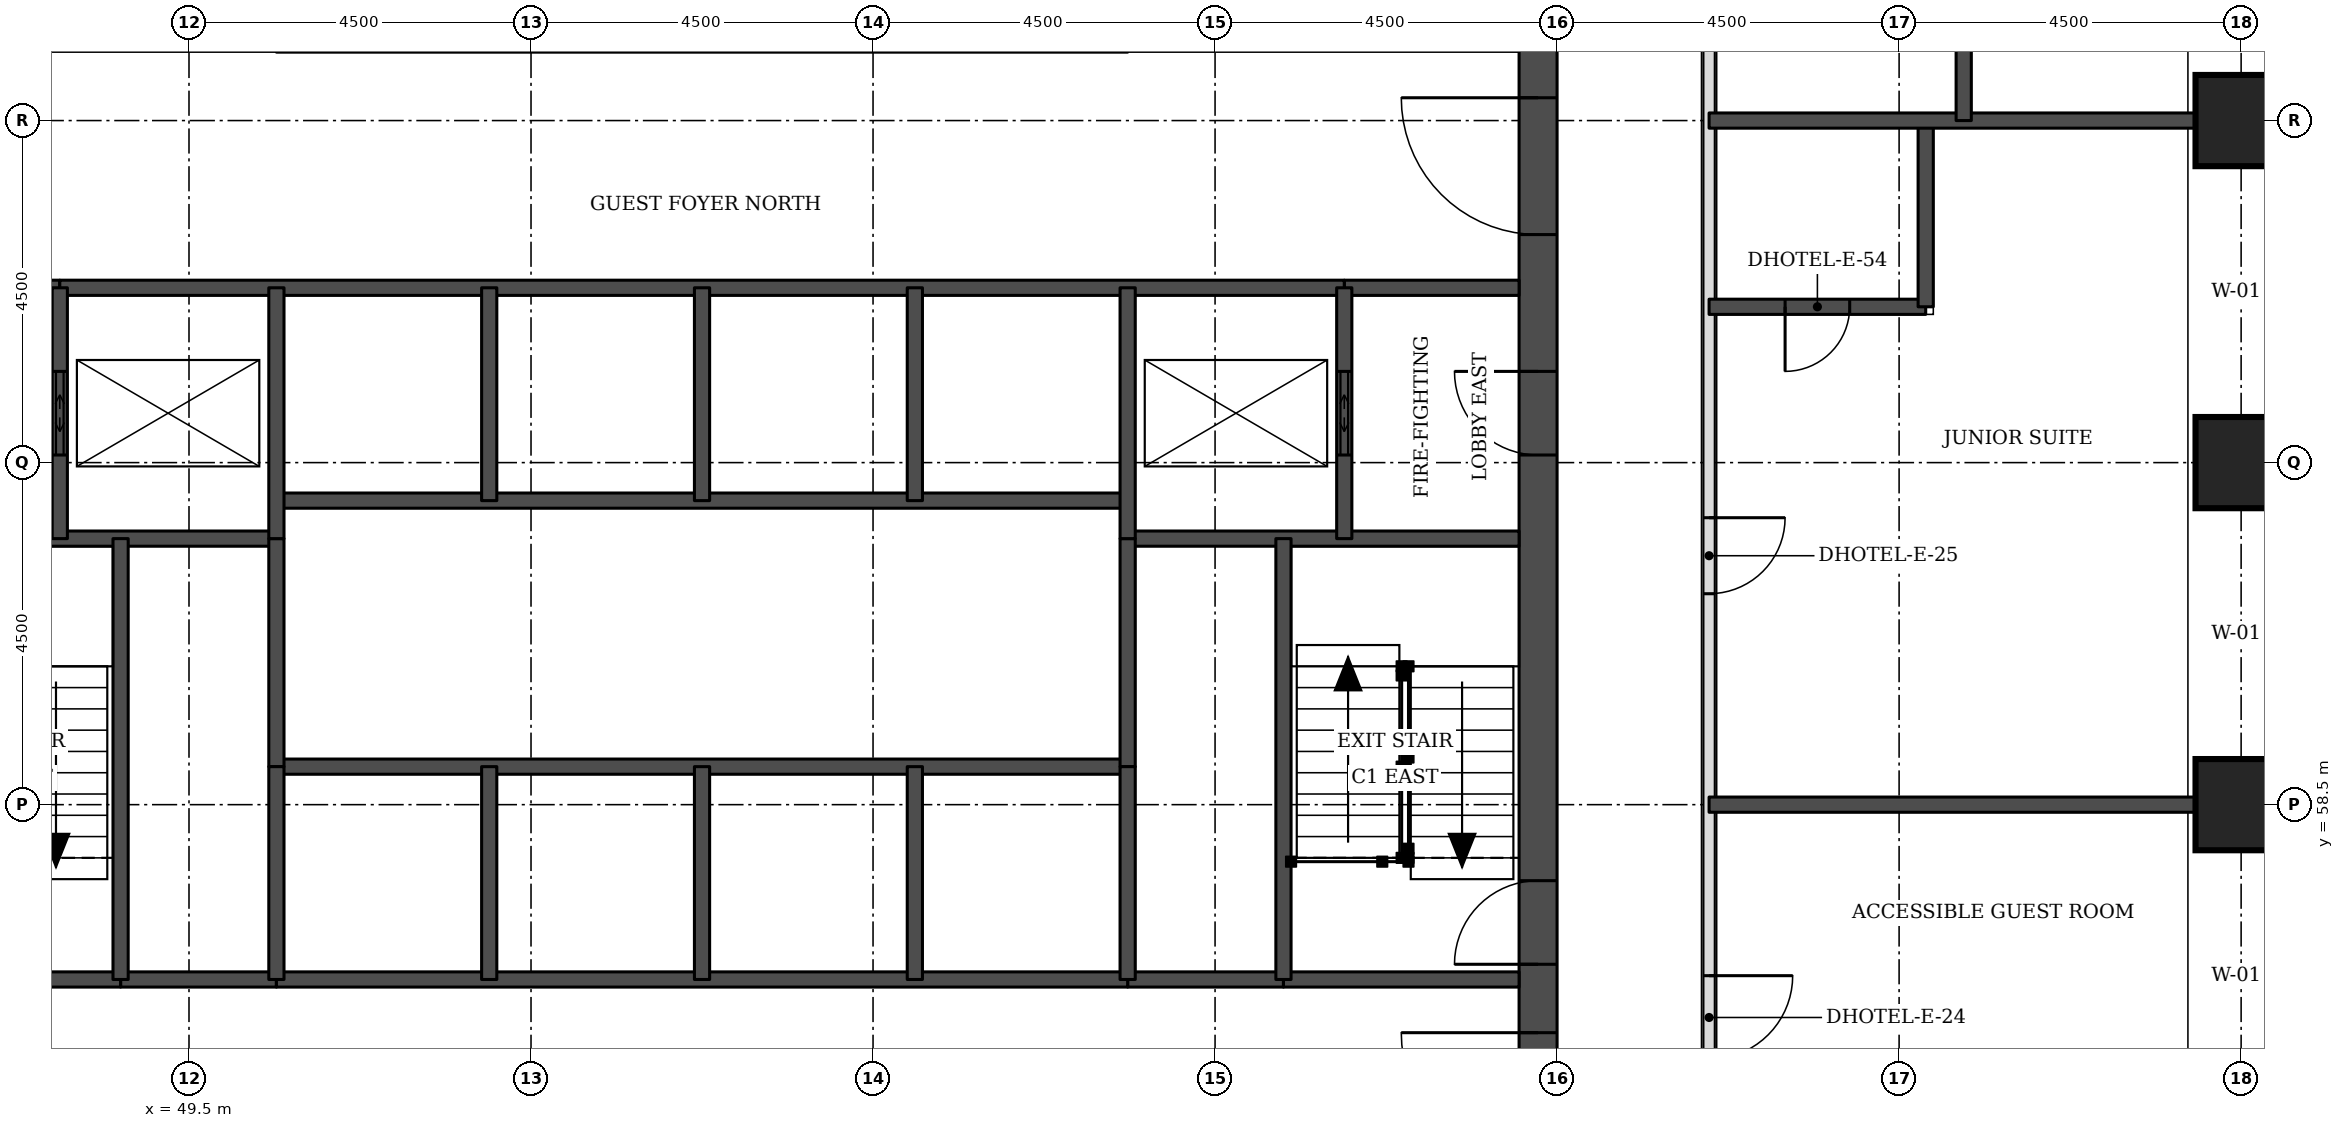
"""IFC4 building model, lengths in metres.
Left out: names, types, materials, properties, quantities, classifications, styles, units other than length and angle.
Written with IfcOpenShell. Run it as: python <this file> out.ifc"""

import sys

from ifc_helpers import new_model, si_unit, direction, frame, frame_2d, origin, origin_2d, place, context, subcontext, project, spatial, rectangle, extrude, element, fill, save


model = new_model("IFC4")
c1 = context("Model", 3, precision=1e-05, world=origin(), true_north=direction((0.0, 1.0)))
c2 = subcontext(c1, "Body", "Model", "MODEL_VIEW")
j1 = project(units=[si_unit("LENGTHUNIT", "METRE"), si_unit("PLANEANGLEUNIT", "RADIAN")], contexts=[c1])
p1 = place(None, origin())
s1 = spatial("IfcSite", under=j1, at=p1, CompositionType="ELEMENT")
p2 = place(p1, origin())
s2 = spatial("IfcBuilding", under=s1, at=p2, CompositionType="ELEMENT")
p3 = place(p2, frame((0.0, 0.0, 62.7)))
s3 = spatial("IfcBuildingStorey", under=s2, at=p3, CompositionType="ELEMENT", Elevation=62.7)
for number, where, z_axis, x_axis in (
    (1, (76.5, 58.5, 0.0), (0.0, 0.0, 1.0), (1.0, 0.0, 0.0)),
    (2, (76.5, 63.0, 0.0), (0.0, 0.0, 1.0), (1.0, 0.0, 0.0)),
    (3, (76.5, 67.5, 0.0), (0.0, 0.0, 1.0), (1.0, 0.0, 0.0)),
):
    element("IfcColumn", number, at=place(p3, frame(where, z_axis=z_axis, x_axis=x_axis)), inside=s3, PredefinedType="COLUMN", context=c2, shape_type="SweptSolid", body=[
        extrude(rectangle(XDim=1.2, YDim=1.2, at=origin_2d()), origin(), (0.0, 0.0, 1.0), 3.3),
    ])
p4 = place(p3, frame((67.25, 49.5, 0.0), z_axis=(0.0, 0.0, 1.0), x_axis=(0.0, 1.0, 0.0)))
e4 = element("IfcWall", 4, at=p4, inside=s3, PredefinedType="SHEAR", context=c2, shape_type="SweptSolid", body=[
    extrude(rectangle(XDim=22.5, YDim=0.5, at=frame_2d((11.25, 0.0))), origin(), (0.0, 0.0, 1.0), 3.3),
])
p5 = place(p4, frame((4.2, 0.0, 0.0)))
e5 = element("IfcOpeningElement", 5, at=p5, cuts=e4, PredefinedType="OPENING", context=c2, shape_type="SweptSolid", body=[
    extrude(rectangle(XDim=1.8, YDim=2.1, at=frame_2d((0.9, 1.05))), frame((0.0, 0.26, 0.0), z_axis=(0.0, -1.0, 0.0), x_axis=(1.0, 0.0, 0.0)), (0.0, 0.0, 1.0), 0.52),
])
p6 = place(p4, frame((6.9, 0.0, 0.0)))
e6 = element("IfcOpeningElement", 6, at=p6, cuts=e4, PredefinedType="OPENING", context=c2, shape_type="SweptSolid", body=[
    extrude(rectangle(XDim=1.1, YDim=2.1, at=frame_2d((0.55, 1.05))), frame((0.0, 0.26, 0.0), z_axis=(0.0, -1.0, 0.0), x_axis=(1.0, 0.0, 0.0)), (0.0, 0.0, 1.0), 0.52),
])
p7 = place(p4, frame((13.6, 0.0, 0.0)))
e7 = element("IfcOpeningElement", 7, at=p7, cuts=e4, PredefinedType="OPENING", context=c2, shape_type="SweptSolid", body=[
    extrude(rectangle(XDim=1.1, YDim=2.1, at=frame_2d((0.55, 1.05))), frame((0.0, 0.26, 0.0), z_axis=(0.0, -1.0, 0.0), x_axis=(1.0, 0.0, 0.0)), (0.0, 0.0, 1.0), 0.52),
])
p8 = place(p4, frame((16.5, 0.0, 0.0)))
e8 = element("IfcOpeningElement", 8, at=p8, cuts=e4, PredefinedType="OPENING", context=c2, shape_type="SweptSolid", body=[
    extrude(rectangle(XDim=1.8, YDim=2.1, at=frame_2d((0.9, 1.05))), frame((0.0, 0.26, 0.0), z_axis=(0.0, -1.0, 0.0), x_axis=(1.0, 0.0, 0.0)), (0.0, 0.0, 1.0), 0.52),
])
p9 = place(p3, frame((69.5, 47.5, 0.0), z_axis=(0.0, 0.0, 1.0), x_axis=(0.0, 1.0, 0.0)))
e9 = element("IfcWall", 9, at=p9, inside=s3, PredefinedType="PARTITIONING", context=c2, shape_type="SweptSolid", body=[
    extrude(rectangle(XDim=26.5, YDim=0.15, at=frame_2d((13.25, 0.0))), origin(), (0.0, 0.0, 1.0), 3.08),
])
p10 = place(p9, frame((25.053, 0.0, 0.0)))
e10 = element("IfcOpeningElement", 10, at=p10, cuts=e9, PredefinedType="OPENING", context=c2, shape_type="SweptSolid", body=[
    extrude(rectangle(XDim=1.0, YDim=2.1, at=frame_2d((0.5, 1.05))), frame((0.0, 0.085, 0.0), z_axis=(0.0, -1.0, 0.0), x_axis=(1.0, 0.0, 0.0)), (0.0, 0.0, 1.0), 0.17),
])
p11 = place(p9, frame((13.775, 0.0, 0.0)))
e11 = element("IfcOpeningElement", 11, at=p11, cuts=e9, PredefinedType="OPENING", context=c2, shape_type="SweptSolid", body=[
    extrude(rectangle(XDim=1.0, YDim=2.1, at=frame_2d((0.5, 1.05))), frame((0.0, 0.085, 0.0), z_axis=(0.0, -1.0, 0.0), x_axis=(1.0, 0.0, 0.0)), (0.0, 0.0, 1.0), 0.17),
])
p12 = place(p9, frame((7.65, 0.0, 0.0)))
e12 = element("IfcOpeningElement", 12, at=p12, cuts=e9, PredefinedType="OPENING", context=c2, shape_type="SweptSolid", body=[
    extrude(rectangle(XDim=1.1, YDim=2.1, at=frame_2d((0.55, 1.05))), frame((0.0, 0.085, 0.0), z_axis=(0.0, -1.0, 0.0), x_axis=(1.0, 0.0, 0.0)), (0.0, 0.0, 1.0), 0.17),
])
p13 = place(p9, frame((0.447, 0.0, 0.0)))
e13 = element("IfcOpeningElement", 13, at=p13, cuts=e9, PredefinedType="OPENING", context=c2, shape_type="SweptSolid", body=[
    extrude(rectangle(XDim=1.0, YDim=2.1, at=frame_2d((0.5, 1.05))), frame((0.0, 0.085, 0.0), z_axis=(0.0, -1.0, 0.0), x_axis=(1.0, 0.0, 0.0)), (0.0, 0.0, 1.0), 0.17),
])
p14 = place(p3, frame((69.5, 58.5, 0.0), z_axis=(0.0, 0.0, 1.0), x_axis=(1.0, 0.0, 0.0)))
e14 = element("IfcWall", 14, at=p14, inside=s3, PredefinedType="SOLIDWALL", context=c2, shape_type="SweptSolid", body=[
    extrude(rectangle(XDim=6.4, YDim=0.2, at=frame_2d((3.2, 0.0))), origin(), (0.0, 0.0, 1.0), 3.08),
])
p15 = place(p3, frame((69.5, 65.05, 0.0), z_axis=(0.0, 0.0, 1.0), x_axis=(1.0, 0.0, 0.0)))
e15 = element("IfcWall", 15, at=p15, inside=s3, PredefinedType="SOLIDWALL", context=c2, shape_type="SweptSolid", body=[
    extrude(rectangle(XDim=2.85, YDim=0.2, at=frame_2d((1.425, 0.0))), origin(), (0.0, 0.0, 1.0), 3.08),
])
p16 = place(p15, frame((1.0, 0.0, 0.0)))
e16 = element("IfcOpeningElement", 16, at=p16, cuts=e15, PredefinedType="OPENING", context=c2, shape_type="SweptSolid", body=[
    extrude(rectangle(XDim=0.85, YDim=2.1, at=frame_2d((0.425, 1.05))), frame((0.0, 0.11, 0.0), z_axis=(0.0, -1.0, 0.0), x_axis=(1.0, 0.0, 0.0)), (0.0, 0.0, 1.0), 0.22),
])
p17 = place(p3, frame((72.35, 65.05, 0.0), z_axis=(0.0, 0.0, 1.0), x_axis=(0.0, 1.0, 0.0)))
e17 = element("IfcWall", 17, at=p17, inside=s3, PredefinedType="SOLIDWALL", context=c2, shape_type="SweptSolid", body=[
    extrude(rectangle(XDim=2.45, YDim=0.2, at=frame_2d((1.225, 0.0))), origin(), (0.0, 0.0, 1.0), 3.08),
])
p18 = place(p3, frame((69.5, 67.5, 0.0), z_axis=(0.0, 0.0, 1.0), x_axis=(1.0, 0.0, 0.0)))
e18 = element("IfcWall", 18, at=p18, inside=s3, PredefinedType="SOLIDWALL", context=c2, shape_type="SweptSolid", body=[
    extrude(rectangle(XDim=6.4, YDim=0.2, at=frame_2d((3.2, 0.0))), origin(), (0.0, 0.0, 1.0), 3.08),
])
p19 = place(p3, frame((72.85, 67.5, 0.0), z_axis=(0.0, 0.0, 1.0), x_axis=(0.0, 1.0, 0.0)))
e19 = element("IfcWall", 19, at=p19, inside=s3, PredefinedType="SOLIDWALL", context=c2, shape_type="SweptSolid", body=[
    extrude(rectangle(XDim=2.95, YDim=0.2, at=frame_2d((1.475, 0.0))), origin(), (0.0, 0.0, 1.0), 3.08),
])
for number, where, z_axis, x_axis in (
    (20, (48.6, 56.2, 0.0), (0.0, 0.0, 1.0), (1.0, 0.0, 0.0)),
    (21, (61.85, 56.2, 0.0), (0.0, 0.0, 1.0), (1.0, 0.0, 0.0)),
):
    element("IfcWall", number, at=place(p3, frame(where, z_axis=z_axis, x_axis=x_axis)), inside=s3, PredefinedType="SOLIDWALL", context=c2, shape_type="SweptSolid", body=[
        extrude(rectangle(XDim=2.05, YDim=0.2, at=frame_2d((1.025, 0.0))), origin(), (0.0, 0.0, 1.0), 3.08),
    ])
p20 = place(p3, frame((45.5, 56.2, 0.0), z_axis=(0.0, 0.0, 1.0), x_axis=(1.0, 0.0, 0.0)))
e22 = element("IfcWall", 22, at=p20, inside=s3, PredefinedType="SOLIDWALL", context=c2, shape_type="SweptSolid", body=[
    extrude(rectangle(XDim=3.1, YDim=0.2, at=frame_2d((1.55, 0.0))), origin(), (0.0, 0.0, 1.0), 3.08),
])
p21 = place(p3, frame((50.65, 56.2, 0.0), z_axis=(0.0, 0.0, 1.0), x_axis=(1.0, 0.0, 0.0)))
e23 = element("IfcWall", 23, at=p21, inside=s3, PredefinedType="SOLIDWALL", context=c2, shape_type="SweptSolid", body=[
    extrude(rectangle(XDim=11.2, YDim=0.2, at=frame_2d((5.6, 0.0))), origin(), (0.0, 0.0, 1.0), 3.08),
])
p22 = place(p3, frame((63.9, 56.2, 0.0), z_axis=(0.0, 0.0, 1.0), x_axis=(1.0, 0.0, 0.0)))
e24 = element("IfcWall", 24, at=p22, inside=s3, PredefinedType="SOLIDWALL", context=c2, shape_type="SweptSolid", body=[
    extrude(rectangle(XDim=3.1, YDim=0.2, at=frame_2d((1.55, 0.0))), origin(), (0.0, 0.0, 1.0), 3.08),
])
p23 = place(p3, frame((50.65, 59.0, 0.0), z_axis=(0.0, 0.0, 1.0), x_axis=(1.0, 0.0, 0.0)))
e25 = element("IfcWall", 25, at=p23, inside=s3, PredefinedType="SOLIDWALL", context=c2, shape_type="SweptSolid", body=[
    extrude(rectangle(XDim=11.2, YDim=0.2, at=frame_2d((5.6, 0.0))), origin(), (0.0, 0.0, 1.0), 3.3),
])
for number, where, z_axis, x_axis in (
    (26, (45.5, 62.0, 0.0), (0.0, 0.0, 1.0), (1.0, 0.0, 0.0)),
    (27, (61.85, 62.0, 0.0), (0.0, 0.0, 1.0), (1.0, 0.0, 0.0)),
):
    element("IfcWall", number, at=place(p3, frame(where, z_axis=z_axis, x_axis=x_axis)), inside=s3, PredefinedType="SOLIDWALL", context=c2, shape_type="SweptSolid", body=[
        extrude(rectangle(XDim=5.15, YDim=0.2, at=frame_2d((2.575, 0.0))), origin(), (0.0, 0.0, 1.0), 3.08),
    ])
p24 = place(p3, frame((50.65, 62.5, 0.0), z_axis=(0.0, 0.0, 1.0), x_axis=(1.0, 0.0, 0.0)))
e28 = element("IfcWall", 28, at=p24, inside=s3, PredefinedType="SOLIDWALL", context=c2, shape_type="SweptSolid", body=[
    extrude(rectangle(XDim=11.2, YDim=0.2, at=frame_2d((5.6, 0.0))), origin(), (0.0, 0.0, 1.0), 3.3),
])
for number, where, z_axis, x_axis in (
    (29, (45.5, 65.3, 0.0), (0.0, 0.0, 1.0), (1.0, 0.0, 0.0)),
    (30, (64.7, 65.3, 0.0), (0.0, 0.0, 1.0), (1.0, 0.0, 0.0)),
):
    element("IfcWall", number, at=place(p3, frame(where, z_axis=z_axis, x_axis=x_axis)), inside=s3, PredefinedType="SOLIDWALL", context=c2, shape_type="SweptSolid", body=[
        extrude(rectangle(XDim=2.3, YDim=0.2, at=frame_2d((1.15, 0.0))), origin(), (0.0, 0.0, 1.0), 3.08),
    ])
p25 = place(p3, frame((47.8, 65.3, 0.0), z_axis=(0.0, 0.0, 1.0), x_axis=(1.0, 0.0, 0.0)))
e31 = element("IfcWall", 31, at=p25, inside=s3, PredefinedType="SOLIDWALL", context=c2, shape_type="SweptSolid", body=[
    extrude(rectangle(XDim=16.9, YDim=0.2, at=frame_2d((8.45, 0.0))), origin(), (0.0, 0.0, 1.0), 3.08),
])
p26 = place(p3, frame((47.8, 62.0, 0.0), z_axis=(0.0, 0.0, 1.0), x_axis=(0.0, 1.0, 0.0)))
e32 = element("IfcWall", 32, at=p26, inside=s3, PredefinedType="SOLIDWALL", context=c2, shape_type="SweptSolid", body=[
    extrude(rectangle(XDim=3.3, YDim=0.2, at=frame_2d((1.65, 0.0))), origin(), (0.0, 0.0, 1.0), 3.08),
])
p27 = place(p26, frame((1.1, 0.0, 0.0)))
e33 = element("IfcOpeningElement", 33, at=p27, cuts=e32, PredefinedType="OPENING", context=c2, shape_type="SweptSolid", body=[
    extrude(rectangle(XDim=1.1, YDim=2.1, at=frame_2d((0.55, 1.05))), frame((0.0, 0.11, 0.0), z_axis=(0.0, -1.0, 0.0), x_axis=(1.0, 0.0, 0.0)), (0.0, 0.0, 1.0), 0.22),
])
p28 = place(p3, frame((48.6, 56.2, 0.0), z_axis=(0.0, 0.0, 1.0), x_axis=(0.0, 1.0, 0.0)))
e34 = element("IfcWall", 34, at=p28, inside=s3, PredefinedType="SOLIDWALL", context=c2, shape_type="SweptSolid", body=[
    extrude(rectangle(XDim=5.8, YDim=0.2, at=frame_2d((2.9, 0.0))), origin(), (0.0, 0.0, 1.0), 3.08),
])
p29 = place(p3, frame((50.65, 59.0, 0.0), z_axis=(0.0, 0.0, 1.0), x_axis=(0.0, 1.0, 0.0)))
e35 = element("IfcWall", 35, at=p29, inside=s3, PredefinedType="SOLIDWALL", context=c2, shape_type="SweptSolid", body=[
    extrude(rectangle(XDim=3.0, YDim=0.2, at=frame_2d((1.5, 0.0))), origin(), (0.0, 0.0, 1.0), 3.3),
])
p30 = place(p3, frame((50.65, 56.2, 0.0), z_axis=(0.0, 0.0, 1.0), x_axis=(0.0, 1.0, 0.0)))
e36 = element("IfcWall", 36, at=p30, inside=s3, PredefinedType="SOLIDWALL", context=c2, shape_type="SweptSolid", body=[
    extrude(rectangle(XDim=2.8, YDim=0.2, at=frame_2d((1.4, 0.0))), origin(), (0.0, 0.0, 1.0), 3.08),
])
p31 = place(p3, frame((50.65, 62.0, 0.0), z_axis=(0.0, 0.0, 1.0), x_axis=(0.0, 1.0, 0.0)))
e37 = element("IfcWall", 37, at=p31, inside=s3, PredefinedType="SOLIDWALL", context=c2, shape_type="SweptSolid", body=[
    extrude(rectangle(XDim=3.3, YDim=0.2, at=frame_2d((1.65, 0.0))), origin(), (0.0, 0.0, 1.0), 3.08),
])
for number, where, z_axis, x_axis in (
    (38, (53.45, 56.2, 0.0), (0.0, 0.0, 1.0), (0.0, 1.0, 0.0)),
    (39, (53.45, 62.5, 0.0), (0.0, 0.0, 1.0), (0.0, 1.0, 0.0)),
    (40, (56.25, 56.2, 0.0), (0.0, 0.0, 1.0), (0.0, 1.0, 0.0)),
    (41, (56.25, 62.5, 0.0), (0.0, 0.0, 1.0), (0.0, 1.0, 0.0)),
    (42, (59.05, 56.2, 0.0), (0.0, 0.0, 1.0), (0.0, 1.0, 0.0)),
    (43, (59.05, 62.5, 0.0), (0.0, 0.0, 1.0), (0.0, 1.0, 0.0)),
):
    element("IfcWall", number, at=place(p3, frame(where, z_axis=z_axis, x_axis=x_axis)), inside=s3, PredefinedType="SOLIDWALL", context=c2, shape_type="SweptSolid", body=[
        extrude(rectangle(XDim=2.8, YDim=0.2, at=frame_2d((1.4, 0.0))), origin(), (0.0, 0.0, 1.0), 3.08),
    ])
p32 = place(p3, frame((61.85, 59.0, 0.0), z_axis=(0.0, 0.0, 1.0), x_axis=(0.0, 1.0, 0.0)))
e44 = element("IfcWall", 44, at=p32, inside=s3, PredefinedType="SOLIDWALL", context=c2, shape_type="SweptSolid", body=[
    extrude(rectangle(XDim=3.0, YDim=0.2, at=frame_2d((1.5, 0.0))), origin(), (0.0, 0.0, 1.0), 3.3),
])
p33 = place(p3, frame((61.85, 56.2, 0.0), z_axis=(0.0, 0.0, 1.0), x_axis=(0.0, 1.0, 0.0)))
e45 = element("IfcWall", 45, at=p33, inside=s3, PredefinedType="SOLIDWALL", context=c2, shape_type="SweptSolid", body=[
    extrude(rectangle(XDim=2.8, YDim=0.2, at=frame_2d((1.4, 0.0))), origin(), (0.0, 0.0, 1.0), 3.08),
])
p34 = place(p3, frame((61.85, 62.0, 0.0), z_axis=(0.0, 0.0, 1.0), x_axis=(0.0, 1.0, 0.0)))
e46 = element("IfcWall", 46, at=p34, inside=s3, PredefinedType="SOLIDWALL", context=c2, shape_type="SweptSolid", body=[
    extrude(rectangle(XDim=3.3, YDim=0.2, at=frame_2d((1.65, 0.0))), origin(), (0.0, 0.0, 1.0), 3.08),
])
p35 = place(p3, frame((63.9, 56.2, 0.0), z_axis=(0.0, 0.0, 1.0), x_axis=(0.0, 1.0, 0.0)))
e47 = element("IfcWall", 47, at=p35, inside=s3, PredefinedType="SOLIDWALL", context=c2, shape_type="SweptSolid", body=[
    extrude(rectangle(XDim=5.8, YDim=0.2, at=frame_2d((2.9, 0.0))), origin(), (0.0, 0.0, 1.0), 3.08),
])
p36 = place(p3, frame((64.7, 62.0, 0.0), z_axis=(0.0, 0.0, 1.0), x_axis=(0.0, 1.0, 0.0)))
e48 = element("IfcWall", 48, at=p36, inside=s3, PredefinedType="SOLIDWALL", context=c2, shape_type="SweptSolid", body=[
    extrude(rectangle(XDim=3.3, YDim=0.2, at=frame_2d((1.65, 0.0))), origin(), (0.0, 0.0, 1.0), 3.08),
])
p37 = place(p36, frame((1.1, 0.0, 0.0)))
e49 = element("IfcOpeningElement", 49, at=p37, cuts=e48, PredefinedType="OPENING", context=c2, shape_type="SweptSolid", body=[
    extrude(rectangle(XDim=1.1, YDim=2.1, at=frame_2d((0.55, 1.05))), frame((0.0, 0.11, 0.0), z_axis=(0.0, -1.0, 0.0), x_axis=(1.0, 0.0, 0.0)), (0.0, 0.0, 1.0), 0.22),
])
p38 = place(p11, frame((1.0, 0.0, 0.0), z_axis=(0.0, 0.0, 1.0), x_axis=(-1.0, 0.0, 0.0)))
e50 = element("IfcDoor", 50, at=p38, inside=s3, OperationType="SINGLE_SWING_LEFT", PredefinedType="DOOR", context=c2, shape_type="SweptSolid", body=[
    extrude(rectangle(XDim=1.0, YDim=2.1, at=frame_2d((0.5, 1.05))), frame((0.0, 0.025, 0.0), z_axis=(0.0, -1.0, 0.0), x_axis=(1.0, 0.0, 0.0)), (0.0, 0.0, 1.0), 0.05),
])
fill(e11, e50)
p39 = place(p16, frame((0.85, 0.0, 0.0), z_axis=(0.0, 0.0, 1.0), x_axis=(-1.0, 0.0, 0.0)))
e51 = element("IfcDoor", 51, at=p39, inside=s3, OperationType="SINGLE_SWING_RIGHT", PredefinedType="DOOR", context=c2, shape_type="SweptSolid", body=[
    extrude(rectangle(XDim=0.85, YDim=2.1, at=frame_2d((0.425, 1.05))), frame((0.0, 0.025, 0.0), z_axis=(0.0, -1.0, 0.0), x_axis=(1.0, 0.0, 0.0)), (0.0, 0.0, 1.0), 0.05),
])
fill(e16, e51)
p40 = place(p12, frame((1.1, 0.0, 0.0), z_axis=(0.0, 0.0, 1.0), x_axis=(-1.0, 0.0, 0.0)))
e52 = element("IfcDoor", 52, at=p40, inside=s3, OperationType="SINGLE_SWING_LEFT", PredefinedType="DOOR", context=c2, shape_type="SweptSolid", body=[
    extrude(rectangle(XDim=1.1, YDim=2.1, at=frame_2d((0.55, 1.05))), frame((0.0, 0.025, 0.0), z_axis=(0.0, -1.0, 0.0), x_axis=(1.0, 0.0, 0.0)), (0.0, 0.0, 1.0), 0.05),
])
fill(e12, e52)
p41 = place(p27, origin())
e53 = element("IfcDoor", 53, at=p41, inside=s3, OperationType="DOUBLE_DOOR_SLIDING", PredefinedType="DOOR", context=c2, shape_type="SweptSolid", body=[
    extrude(rectangle(XDim=1.1, YDim=2.1, at=frame_2d((0.55, 1.05))), frame((0.0, 0.025, 0.0), z_axis=(0.0, -1.0, 0.0), x_axis=(1.0, 0.0, 0.0)), (0.0, 0.0, 1.0), 0.05),
])
fill(e33, e53)
p42 = place(p37, origin())
e54 = element("IfcDoor", 54, at=p42, inside=s3, OperationType="DOUBLE_DOOR_SLIDING", PredefinedType="DOOR", context=c2, shape_type="SweptSolid", body=[
    extrude(rectangle(XDim=1.1, YDim=2.1, at=frame_2d((0.55, 1.05))), frame((0.0, 0.025, 0.0), z_axis=(0.0, -1.0, 0.0), x_axis=(1.0, 0.0, 0.0)), (0.0, 0.0, 1.0), 0.05),
])
fill(e49, e54)
p43 = place(p5, origin())
e55 = element("IfcDoor", 55, at=p43, inside=s3, OperationType="SINGLE_SWING_RIGHT", PredefinedType="DOOR", context=c2, shape_type="SweptSolid", body=[
    extrude(rectangle(XDim=1.8, YDim=2.1, at=frame_2d((0.9, 1.05))), frame((0.0, 0.025, 0.0), z_axis=(0.0, -1.0, 0.0), x_axis=(1.0, 0.0, 0.0)), (0.0, 0.0, 1.0), 0.05),
])
fill(e5, e55)
p44 = place(p6, origin())
e56 = element("IfcDoor", 56, at=p44, inside=s3, OperationType="SINGLE_SWING_LEFT", PredefinedType="DOOR", context=c2, shape_type="SweptSolid", body=[
    extrude(rectangle(XDim=1.1, YDim=2.1, at=frame_2d((0.55, 1.05))), frame((0.0, 0.025, 0.0), z_axis=(0.0, -1.0, 0.0), x_axis=(1.0, 0.0, 0.0)), (0.0, 0.0, 1.0), 0.05),
])
fill(e6, e56)
p45 = place(p7, origin())
e57 = element("IfcDoor", 57, at=p45, inside=s3, OperationType="SINGLE_SWING_RIGHT", PredefinedType="DOOR", context=c2, shape_type="SweptSolid", body=[
    extrude(rectangle(XDim=1.1, YDim=2.1, at=frame_2d((0.55, 1.05))), frame((0.0, 0.025, 0.0), z_axis=(0.0, -1.0, 0.0), x_axis=(1.0, 0.0, 0.0)), (0.0, 0.0, 1.0), 0.05),
])
fill(e7, e57)
p46 = place(p8, origin())
e58 = element("IfcDoor", 58, at=p46, inside=s3, OperationType="SINGLE_SWING_RIGHT", PredefinedType="DOOR", context=c2, shape_type="SweptSolid", body=[
    extrude(rectangle(XDim=1.8, YDim=2.1, at=frame_2d((0.9, 1.05))), frame((0.0, 0.025, 0.0), z_axis=(0.0, -1.0, 0.0), x_axis=(1.0, 0.0, 0.0)), (0.0, 0.0, 1.0), 0.05),
])
fill(e8, e58)
save(model, sys.argv[1])
